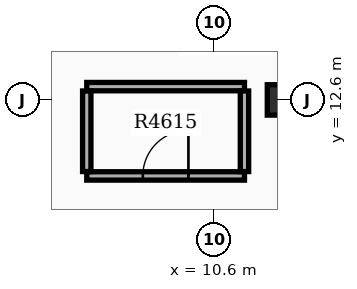
"""IFC4 building model, lengths in metres.
Left out: names, types, materials, properties, quantities, classifications, styles, units other than length and angle.
Written with IfcOpenShell. Run it as: python <this file> out.ifc"""

import sys

from ifc_helpers import new_model, si_unit, direction, frame, frame_2d, origin, origin_2d, place, context, subcontext, project, spatial, rectangle, extrude, element, fill, save


model = new_model("IFC4")
c1 = context("Model", 3, precision=1e-05, world=origin(), true_north=direction((0.0, 1.0)))
c2 = subcontext(c1, "Body", "Model", "MODEL_VIEW")
j1 = project(units=[si_unit("LENGTHUNIT", "METRE"), si_unit("PLANEANGLEUNIT", "RADIAN")], contexts=[c1])
p1 = place(None, origin())
s1 = spatial("IfcSite", under=j1, at=p1, CompositionType="ELEMENT")
p2 = place(p1, origin())
s2 = spatial("IfcBuilding", under=s1, at=p2, CompositionType="ELEMENT")
p3 = place(p2, frame((0.0, 0.0, 288.9)))
s3 = spatial("IfcBuildingStorey", under=s2, at=p3, CompositionType="ELEMENT", Elevation=288.9)
p4 = place(p3, frame((12.4, 12.6, 0.0), z_axis=(0.0, 0.0, 1.0), x_axis=(1.0, 0.0, 0.0)))
e1 = element("IfcColumn", 1, at=p4, inside=s3, PredefinedType="COLUMN", context=c2, shape_type="SweptSolid", body=[
    extrude(rectangle(XDim=0.8, YDim=0.8, at=origin_2d()), origin(), (0.0, 0.0, 1.0), 5.1),
])
p5 = place(p3, frame((7.25, 10.6, 0.0), z_axis=(0.0, 0.0, 1.0), x_axis=(1.0, 0.0, 0.0)))
e2 = element("IfcWall", 2, at=p5, inside=s3, PredefinedType="PARTITIONING", context=c2, shape_type="SweptSolid", body=[
    extrude(rectangle(XDim=4.15, YDim=0.22, at=frame_2d((2.075, 0.0))), origin(), (0.0, 0.0, 1.0), 3.92),
])
p6 = place(p5, frame((1.475, 0.0, 0.0)))
e3 = element("IfcOpeningElement", 3, at=p6, cuts=e2, PredefinedType="OPENING", context=c2, shape_type="SweptSolid", body=[
    extrude(rectangle(XDim=1.2, YDim=2.15, at=frame_2d((0.6, 1.075))), frame((0.0, 0.12, 0.0), z_axis=(0.0, -1.0, 0.0), x_axis=(1.0, 0.0, 0.0)), (0.0, 0.0, 1.0), 0.24),
])
p7 = place(p3, frame((7.25, 12.95, 0.0), z_axis=(0.0, 0.0, 1.0), x_axis=(1.0, 0.0, 0.0)))
e4 = element("IfcWall", 4, at=p7, inside=s3, PredefinedType="PARTITIONING", context=c2, shape_type="SweptSolid", body=[
    extrude(rectangle(XDim=4.15, YDim=0.22, at=frame_2d((2.075, 0.0))), origin(), (0.0, 0.0, 1.0), 3.92),
])
for number, where, z_axis, x_axis in (
    (5, (7.25, 10.715, 0.0), (0.0, 0.0, 1.0), (0.0, 1.0, 0.0)),
    (6, (11.4, 10.715, 0.0), (0.0, 0.0, 1.0), (0.0, 1.0, 0.0)),
):
    element("IfcWall", number, at=place(p3, frame(where, z_axis=z_axis, x_axis=x_axis)), inside=s3, PredefinedType="PARTITIONING", context=c2, shape_type="SweptSolid", body=[
        extrude(rectangle(XDim=2.12, YDim=0.22, at=frame_2d((1.06, 0.0))), origin(), (0.0, 0.0, 1.0), 3.92),
    ])
p8 = place(p6, origin())
e7 = element("IfcDoor", 7, at=p8, inside=s3, OperationType="SINGLE_SWING_RIGHT", PredefinedType="DOOR", context=c2, shape_type="SweptSolid", body=[
    extrude(rectangle(XDim=1.2, YDim=2.15, at=frame_2d((0.6, 1.075))), frame((0.0, 0.025, 0.0), z_axis=(0.0, -1.0, 0.0), x_axis=(1.0, 0.0, 0.0)), (0.0, 0.0, 1.0), 0.05),
])
fill(e3, e7)
save(model, sys.argv[1])
